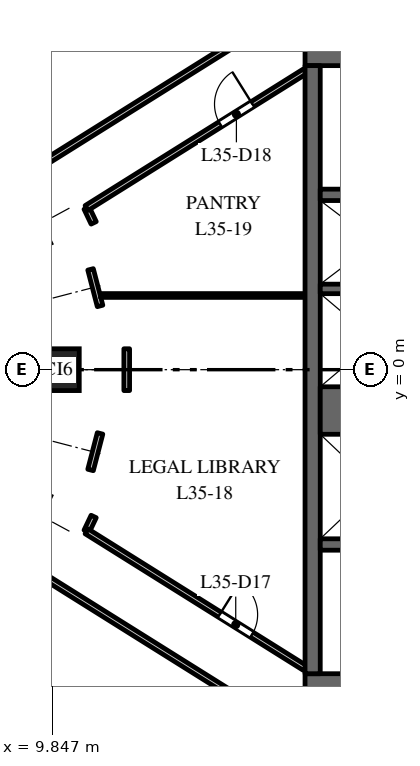
"""IFC4 building model, lengths in metres.
Left out: names, types, materials, properties, quantities, classifications, styles, units other than length and angle.
Written with IfcOpenShell. Run it as: python <this file> out.ifc"""

import sys

from ifc_helpers import new_model, si_unit, direction, frame, frame_2d, origin, origin_2d, place, context, subcontext, project, spatial, rectangle, extrude, element, fill, save


model = new_model("IFC4")
c1 = context("Model", 3, precision=1e-05, world=origin(), true_north=direction((0.0, 1.0)))
c2 = subcontext(c1, "Body", "Model", "MODEL_VIEW")
j1 = project(units=[si_unit("LENGTHUNIT", "METRE"), si_unit("PLANEANGLEUNIT", "RADIAN")], contexts=[c1])
p1 = place(None, origin())
s1 = spatial("IfcSite", under=j1, at=p1, CompositionType="ELEMENT")
p2 = place(p1, origin())
s2 = spatial("IfcBuilding", under=s1, at=p2, CompositionType="ELEMENT")
p3 = place(p2, frame((0.0, 0.0, 154.0)))
s3 = spatial("IfcBuildingStorey", under=s2, at=p3, CompositionType="ELEMENT", Elevation=154.0)
p4 = place(p3, frame((10.008, 0.0, 0.0), z_axis=(0.0, 0.0, 1.0), x_axis=(0.0, 1.0, 0.0)))
e1 = element("IfcColumn", 1, at=p4, inside=s3, PredefinedType="COLUMN", context=c2, shape_type="SweptSolid", body=[
    extrude(rectangle(XDim=1.1, YDim=1.1, at=origin_2d()), origin(), (0.0, 0.0, 1.0), 4.0),
])
p5 = place(p3, frame((16.5, 8.25, 0.0), z_axis=(0.0, 0.0, 1.0), x_axis=(1.0, 0.0, 0.0)))
e2 = element("IfcWall", 2, at=p5, inside=s3, PredefinedType="SHEAR", context=c2, shape_type="SweptSolid", body=[
    extrude(rectangle(XDim=15.0, YDim=0.5, at=frame_2d((7.5, 0.0))), origin(), (0.0, 0.0, 1.0), 3.7),
])
p6 = place(p5, frame((6.9, 0.0, 0.0)))
e3 = element("IfcOpeningElement", 3, at=p6, cuts=e2, PredefinedType="OPENING", context=c2, shape_type="SweptSolid", body=[
    extrude(rectangle(XDim=1.2, YDim=2.1, at=frame_2d((0.6, 1.05))), frame((0.0, 0.26, 0.0), z_axis=(0.0, -1.0, 0.0), x_axis=(1.0, 0.0, 0.0)), (0.0, 0.0, 1.0), 0.52),
])
p7 = place(p5, frame((12.95, 0.0, 0.0)))
e4 = element("IfcOpeningElement", 4, at=p7, cuts=e2, PredefinedType="OPENING", context=c2, shape_type="SweptSolid", body=[
    extrude(rectangle(XDim=0.9, YDim=2.1, at=frame_2d((0.45, 1.05))), frame((0.0, 0.26, 0.0), z_axis=(0.0, -1.0, 0.0), x_axis=(1.0, 0.0, 0.0)), (0.0, 0.0, 1.0), 0.52),
])
p8 = place(p3, frame((16.5, -8.25, 0.0), z_axis=(0.0, 0.0, 1.0), x_axis=(1.0, 0.0, 0.0)))
e5 = element("IfcWall", 5, at=p8, inside=s3, PredefinedType="SHEAR", context=c2, shape_type="SweptSolid", body=[
    extrude(rectangle(XDim=15.0, YDim=0.5, at=frame_2d((7.5, 0.0))), origin(), (0.0, 0.0, 1.0), 3.7),
])
p9 = place(p8, frame((6.9, 0.0, 0.0)))
e6 = element("IfcOpeningElement", 6, at=p9, cuts=e5, PredefinedType="OPENING", context=c2, shape_type="SweptSolid", body=[
    extrude(rectangle(XDim=1.2, YDim=2.1, at=frame_2d((0.6, 1.05))), frame((0.0, 0.26, 0.0), z_axis=(0.0, -1.0, 0.0), x_axis=(1.0, 0.0, 0.0)), (0.0, 0.0, 1.0), 0.52),
])
p10 = place(p8, frame((12.275, 0.0, 0.0)))
e7 = element("IfcOpeningElement", 7, at=p10, cuts=e5, PredefinedType="OPENING", context=c2, shape_type="SweptSolid", body=[
    extrude(rectangle(XDim=0.9, YDim=2.1, at=frame_2d((0.45, 1.05))), frame((0.0, 0.26, 0.0), z_axis=(0.0, -1.0, 0.0), x_axis=(1.0, 0.0, 0.0)), (0.0, 0.0, 1.0), 0.52),
])
p11 = place(p3, frame((16.7, -8.0, 0.0), z_axis=(0.0, 0.0, 1.0), x_axis=(0.0, 1.0, 0.0)))
e8 = element("IfcWall", 8, at=p11, inside=s3, PredefinedType="SHEAR", context=c2, shape_type="SweptSolid", body=[
    extrude(rectangle(XDim=16.0, YDim=0.4, at=frame_2d((8.0, 0.0))), origin(), (0.0, 0.0, 1.0), 3.7),
])
p12 = place(p3, frame((16.9, -1.075, 0.0), z_axis=(0.0, 0.0, 1.0), x_axis=(1.0, 0.0, 0.0)))
e9 = element("IfcWall", 9, at=p12, inside=s3, PredefinedType="SHEAR", context=c2, shape_type="SweptSolid", body=[
    extrude(rectangle(XDim=2.9, YDim=1.25, at=frame_2d((1.45, 0.0))), origin(), (0.0, 0.0, 1.0), 3.7),
])
p13 = place(p3, frame((16.9, 2.125, 0.0), z_axis=(0.0, 0.0, 1.0), x_axis=(1.0, 0.0, 0.0)))
e10 = element("IfcWall", 10, at=p13, inside=s3, PredefinedType="SHEAR", context=c2, shape_type="SweptSolid", body=[
    extrude(rectangle(XDim=2.9, YDim=0.25, at=frame_2d((1.45, 0.0))), origin(), (0.0, 0.0, 1.0), 3.7),
])
p14 = place(p3, frame((16.9, 4.6, 0.0), z_axis=(0.0, 0.0, 1.0), x_axis=(1.0, 0.0, 0.0)))
e11 = element("IfcWall", 11, at=p14, inside=s3, PredefinedType="SHEAR", context=c2, shape_type="SweptSolid", body=[
    extrude(rectangle(XDim=6.18, YDim=0.3, at=frame_2d((3.09, 0.0))), origin(), (0.0, 0.0, 1.0), 3.7),
])
p15 = place(p14, frame((4.9, 0.0, 0.0)))
e12 = element("IfcOpeningElement", 12, at=p15, cuts=e11, PredefinedType="OPENING", context=c2, shape_type="SweptSolid", body=[
    extrude(rectangle(XDim=1.1, YDim=2.1, at=frame_2d((0.55, 1.05))), frame((0.0, 0.16, 0.0), z_axis=(0.0, -1.0, 0.0), x_axis=(1.0, 0.0, 0.0)), (0.0, 0.0, 1.0), 0.32),
])
p16 = place(p3, frame((16.9, -4.6, 0.0), z_axis=(0.0, 0.0, 1.0), x_axis=(1.0, 0.0, 0.0)))
e13 = element("IfcWall", 13, at=p16, inside=s3, PredefinedType="SHEAR", context=c2, shape_type="SweptSolid", body=[
    extrude(rectangle(XDim=6.18, YDim=0.3, at=frame_2d((3.09, 0.0))), origin(), (0.0, 0.0, 1.0), 3.7),
])
p17 = place(p16, frame((4.9, 0.0, 0.0)))
e14 = element("IfcOpeningElement", 14, at=p17, cuts=e13, PredefinedType="OPENING", context=c2, shape_type="SweptSolid", body=[
    extrude(rectangle(XDim=1.1, YDim=2.1, at=frame_2d((0.55, 1.05))), frame((0.0, 0.16, 0.0), z_axis=(0.0, -1.0, 0.0), x_axis=(1.0, 0.0, 0.0)), (0.0, 0.0, 1.0), 0.32),
])
p18 = place(p3, frame((8.477, -7.111, 0.0), z_axis=(0.0, 0.0, 1.0), x_axis=(0.338406456341, -0.941000037357, 0.0)))
e15 = element("IfcWall", 15, at=p18, inside=s3, PredefinedType="PARTITIONING", context=c2, shape_type="SweptSolid", body=[
    extrude(rectangle(XDim=19.418, YDim=0.1, at=frame_2d((9.709, 0.0))), origin(), (0.0, 0.0, 1.0), 2.85),
])
p19 = place(p3, frame((8.478, 7.111, 0.0), z_axis=(0.0, 0.0, 1.0), x_axis=(0.338361922043, 0.941016051782, 0.0)))
e16 = element("IfcWall", 16, at=p19, inside=s3, PredefinedType="PARTITIONING", context=c2, shape_type="SweptSolid", body=[
    extrude(rectangle(XDim=19.417, YDim=0.1, at=frame_2d((9.708, 0.0))), origin(), (0.0, 0.0, 1.0), 2.85),
])
for number, where, z_axis, x_axis in (
    (17, (9.736, -5.505, 0.0), (0.0, 0.0, 1.0), (0.848, -0.531, 0.0)),
    (18, (9.736, 5.505, 0.0), (0.0, 0.0, 1.0), (0.848, 0.531, 0.0)),
):
    element("IfcWall", number, at=place(p3, frame(where, z_axis=z_axis, x_axis=x_axis)), inside=s3, PredefinedType="PARTITIONING", context=c2, shape_type="SweptSolid", body=[
        extrude(rectangle(XDim=6.315, YDim=0.15, at=frame_2d((3.158, 0.0))), origin(), (0.0, 0.0, 1.0), 3.7),
    ])
p20 = place(p3, frame((10.752, -4.254, 0.0), z_axis=(0.0, 0.0, 1.0), x_axis=(0.429758433873, 0.90294390109, 0.0)))
e19 = element("IfcWall", 19, at=p20, inside=s3, PredefinedType="PARTITIONING", context=c2, shape_type="SweptSolid", body=[
    extrude(rectangle(XDim=0.433, YDim=0.15, at=frame_2d((0.216, 0.0))), origin(), (0.0, 0.0, 1.0), 3.7),
])
p21 = place(p3, frame((10.752, -4.254, 0.0), z_axis=(0.0, 0.0, 1.0), x_axis=(0.847690706888, -0.530490777917, 0.0)))
e20 = element("IfcWall", 20, at=p21, inside=s3, PredefinedType="PARTITIONING", context=c2, shape_type="SweptSolid", body=[
    extrude(rectangle(XDim=6.781, YDim=0.15, at=frame_2d((3.39, 0.0))), origin(), (0.0, 0.0, 1.0), 3.7),
])
p22 = place(p21, frame((4.129, 0.0, 0.0)))
e21 = element("IfcOpeningElement", 21, at=p22, cuts=e20, PredefinedType="OPENING", context=c2, shape_type="SweptSolid", body=[
    extrude(rectangle(XDim=1.0, YDim=2.1, at=frame_2d((0.5, 1.05))), frame((0.0, 0.085, 0.0), z_axis=(0.0, -1.0, 0.0), x_axis=(1.0, 0.0, 0.0)), (0.0, 0.0, 1.0), 0.17),
])
p23 = place(p3, frame((10.752, 4.254, 0.0), z_axis=(0.0, 0.0, 1.0), x_axis=(0.429758433873, -0.90294390109, 0.0)))
e22 = element("IfcWall", 22, at=p23, inside=s3, PredefinedType="PARTITIONING", context=c2, shape_type="SweptSolid", body=[
    extrude(rectangle(XDim=0.433, YDim=0.15, at=frame_2d((0.216, 0.0))), origin(), (0.0, 0.0, 1.0), 3.7),
])
p24 = place(p3, frame((10.752, 4.254, 0.0), z_axis=(0.0, 0.0, 1.0), x_axis=(0.847690706888, 0.530490777917, 0.0)))
e23 = element("IfcWall", 23, at=p24, inside=s3, PredefinedType="PARTITIONING", context=c2, shape_type="SweptSolid", body=[
    extrude(rectangle(XDim=6.781, YDim=0.15, at=frame_2d((3.39, 0.0))), origin(), (0.0, 0.0, 1.0), 3.7),
])
p25 = place(p24, frame((4.15, 0.0, 0.0)))
e24 = element("IfcOpeningElement", 24, at=p25, cuts=e23, PredefinedType="OPENING", context=c2, shape_type="SweptSolid", body=[
    extrude(rectangle(XDim=1.0, YDim=2.1, at=frame_2d((0.5, 1.05))), frame((0.0, 0.085, 0.0), z_axis=(0.0, -1.0, 0.0), x_axis=(1.0, 0.0, 0.0)), (0.0, 0.0, 1.0), 0.17),
])
for number, where, z_axis, x_axis in (
    (25, (10.856, -2.639, 0.0), (0.0, 0.0, 1.0), (0.252, 0.968, 0.0)),
    (26, (10.856, 2.639, 0.0), (0.0, 0.0, 1.0), (0.252, -0.968, 0.0)),
):
    element("IfcWall", number, at=place(p3, frame(where, z_axis=z_axis, x_axis=x_axis)), inside=s3, PredefinedType="PARTITIONING", context=c2, shape_type="SweptSolid", body=[
        extrude(rectangle(XDim=0.994, YDim=0.15, at=frame_2d((0.497, 0.0))), origin(), (0.0, 0.0, 1.0), 3.7),
    ])
p26 = place(p3, frame((11.116, 1.952, 0.0), z_axis=(0.0, 0.0, 1.0), x_axis=(1.0, 0.0, 0.0)))
e27 = element("IfcWall", 27, at=p26, inside=s3, PredefinedType="PARTITIONING", context=c2, shape_type="SweptSolid", body=[
    extrude(rectangle(XDim=5.384, YDim=0.1, at=frame_2d((2.692, 0.0))), origin(), (0.0, 0.0, 1.0), 3.7),
])
p27 = place(p3, frame((11.808, -0.55, 0.0), z_axis=(0.0, 0.0, 1.0), x_axis=(0.0, 1.0, 0.0)))
e28 = element("IfcWall", 28, at=p27, inside=s3, PredefinedType="PARTITIONING", context=c2, shape_type="SweptSolid", body=[
    extrude(rectangle(XDim=1.1, YDim=0.15, at=frame_2d((0.55, 0.0))), origin(), (0.0, 0.0, 1.0), 3.7),
])
p28 = place(p22, origin())
e29 = element("IfcDoor", 29, at=p28, inside=s3, OperationType="SINGLE_SWING_LEFT", PredefinedType="DOOR", context=c2, shape_type="SweptSolid", body=[
    extrude(rectangle(XDim=1.0, YDim=2.1, at=frame_2d((0.5, 1.05))), frame((0.0, 0.025, 0.0), z_axis=(0.0, -1.0, 0.0), x_axis=(1.0, 0.0, 0.0)), (0.0, 0.0, 1.0), 0.05),
])
fill(e21, e29)
p29 = place(p25, origin())
e30 = element("IfcDoor", 30, at=p29, inside=s3, OperationType="SINGLE_SWING_RIGHT", PredefinedType="DOOR", context=c2, shape_type="SweptSolid", body=[
    extrude(rectangle(XDim=1.0, YDim=2.1, at=frame_2d((0.5, 1.05))), frame((0.0, 0.025, 0.0), z_axis=(0.0, -1.0, 0.0), x_axis=(1.0, 0.0, 0.0)), (0.0, 0.0, 1.0), 0.05),
])
fill(e24, e30)
save(model, sys.argv[1])
